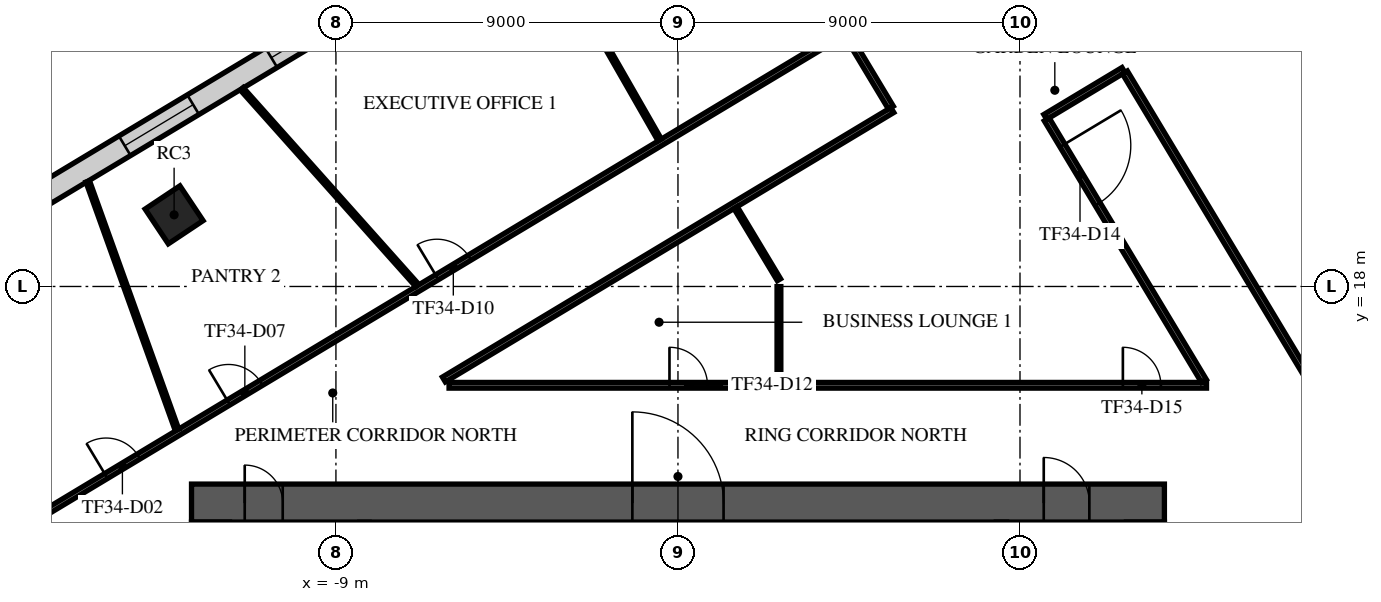
"""IFC4 building model, lengths in metres.
Left out: names, types, materials, properties, quantities, classifications, styles, units other than length and angle.
Written with IfcOpenShell. Run it as: python <this file> out.ifc"""

import sys

from ifc_helpers import new_model, si_unit, direction, frame, frame_2d, origin, origin_2d, place, context, subcontext, project, spatial, rectangle, extrude, element, fill, save


model = new_model("IFC4")
c1 = context("Model", 3, precision=1e-05, world=origin(), true_north=direction((0.0, 1.0)))
c2 = subcontext(c1, "Body", "Model", "MODEL_VIEW")
j1 = project(units=[si_unit("LENGTHUNIT", "METRE"), si_unit("PLANEANGLEUNIT", "RADIAN")], contexts=[c1])
p1 = place(None, origin())
s1 = spatial("IfcSite", under=j1, at=p1, CompositionType="ELEMENT")
p2 = place(p1, origin())
s2 = spatial("IfcBuilding", under=s1, at=p2, CompositionType="ELEMENT")
p3 = place(p2, frame((0.0, 0.0, 147.7)))
s3 = spatial("IfcBuildingStorey", under=s2, at=p3, CompositionType="ELEMENT", Elevation=147.7)
p4 = place(p3, frame((-13.258, 19.885, 0.0), z_axis=(0.0, 0.0, 1.0), x_axis=(0.832028680356, 0.55473261583, 0.0)))
e1 = element("IfcColumn", 1, at=p4, inside=s3, PredefinedType="COLUMN", context=c2, shape_type="SweptSolid", body=[
    extrude(rectangle(XDim=1.1, YDim=1.1, at=origin_2d()), origin(), (0.0, 0.0, 1.0), 4.0),
])
p5 = place(p3, frame((-12.8, 12.3, 0.0), z_axis=(0.0, 0.0, 1.0), x_axis=(1.0, 0.0, 0.0)))
e2 = element("IfcWall", 2, at=p5, inside=s3, PredefinedType="SHEAR", context=c2, shape_type="SweptSolid", body=[
    extrude(rectangle(XDim=25.6, YDim=1.0, at=frame_2d((12.8, 0.0))), origin(), (0.0, 0.0, 1.0), 3.6),
])
p6 = place(p5, frame((11.6, 0.0, 0.0)))
e3 = element("IfcOpeningElement", 3, at=p6, cuts=e2, PredefinedType="OPENING", context=c2, shape_type="SweptSolid", body=[
    extrude(rectangle(XDim=2.4, YDim=2.4, at=frame_2d((1.2, 1.2))), frame((0.0, 0.51, 0.0), z_axis=(0.0, -1.0, 0.0), x_axis=(1.0, 0.0, 0.0)), (0.0, 0.0, 1.0), 1.02),
])
p7 = place(p5, frame((22.425, 0.0, 0.0)))
e4 = element("IfcOpeningElement", 4, at=p7, cuts=e2, PredefinedType="OPENING", context=c2, shape_type="SweptSolid", body=[
    extrude(rectangle(XDim=1.2, YDim=2.1, at=frame_2d((0.6, 1.05))), frame((0.0, 0.51, 0.0), z_axis=(0.0, -1.0, 0.0), x_axis=(1.0, 0.0, 0.0)), (0.0, 0.0, 1.0), 1.02),
])
p8 = place(p5, frame((1.4, 0.0, 0.0)))
e5 = element("IfcOpeningElement", 5, at=p8, cuts=e2, PredefinedType="OPENING", context=c2, shape_type="SweptSolid", body=[
    extrude(rectangle(XDim=1.0, YDim=2.1, at=frame_2d((0.5, 1.05))), frame((0.0, 0.51, 0.0), z_axis=(0.0, -1.0, 0.0), x_axis=(1.0, 0.0, 0.0)), (0.0, 0.0, 1.0), 1.02),
])
p9 = place(p3, frame((7.558, 34.99, 0.0), z_axis=(0.0, 0.0, 1.0), x_axis=(-0.857166849875, -0.515038825212, 0.0)))
e6 = element("IfcWall", 6, at=p9, inside=s3, PredefinedType="STANDARD", context=c2, shape_type="SweptSolid", body=[
    extrude(rectangle(XDim=49.376, YDim=0.6, at=frame_2d((24.688, 0.0))), origin(), (0.0, 0.0, 1.0), 3.6),
])
p10 = place(p9, frame((1.2, 0.0, 0.9)))
e7 = element("IfcOpeningElement", 7, at=p10, cuts=e6, PredefinedType="OPENING", context=c2, shape_type="SweptSolid", body=[
    extrude(rectangle(XDim=2.1, YDim=2.1, at=frame_2d((1.05, 1.05))), frame((0.0, 0.31, 0.0), z_axis=(0.0, -1.0, 0.0), x_axis=(1.0, 0.0, 0.0)), (0.0, 0.0, 1.0), 0.62),
])
p11 = place(p9, frame((5.7, 0.0, 0.9)))
e8 = element("IfcOpeningElement", 8, at=p11, cuts=e6, PredefinedType="OPENING", context=c2, shape_type="SweptSolid", body=[
    extrude(rectangle(XDim=2.1, YDim=2.1, at=frame_2d((1.05, 1.05))), frame((0.0, 0.31, 0.0), z_axis=(0.0, -1.0, 0.0), x_axis=(1.0, 0.0, 0.0)), (0.0, 0.0, 1.0), 0.62),
])
p12 = place(p9, frame((10.2, 0.0, 0.9)))
e9 = element("IfcOpeningElement", 9, at=p12, cuts=e6, PredefinedType="OPENING", context=c2, shape_type="SweptSolid", body=[
    extrude(rectangle(XDim=2.1, YDim=2.1, at=frame_2d((1.05, 1.05))), frame((0.0, 0.31, 0.0), z_axis=(0.0, -1.0, 0.0), x_axis=(1.0, 0.0, 0.0)), (0.0, 0.0, 1.0), 0.62),
])
p13 = place(p9, frame((14.7, 0.0, 0.9)))
e10 = element("IfcOpeningElement", 10, at=p13, cuts=e6, PredefinedType="OPENING", context=c2, shape_type="SweptSolid", body=[
    extrude(rectangle(XDim=2.1, YDim=2.1, at=frame_2d((1.05, 1.05))), frame((0.0, 0.31, 0.0), z_axis=(0.0, -1.0, 0.0), x_axis=(1.0, 0.0, 0.0)), (0.0, 0.0, 1.0), 0.62),
])
p14 = place(p9, frame((19.2, 0.0, 0.9)))
e11 = element("IfcOpeningElement", 11, at=p14, cuts=e6, PredefinedType="OPENING", context=c2, shape_type="SweptSolid", body=[
    extrude(rectangle(XDim=2.1, YDim=2.1, at=frame_2d((1.05, 1.05))), frame((0.0, 0.31, 0.0), z_axis=(0.0, -1.0, 0.0), x_axis=(1.0, 0.0, 0.0)), (0.0, 0.0, 1.0), 0.62),
])
p15 = place(p9, frame((23.7, 0.0, 0.9)))
e12 = element("IfcOpeningElement", 12, at=p15, cuts=e6, PredefinedType="OPENING", context=c2, shape_type="SweptSolid", body=[
    extrude(rectangle(XDim=2.1, YDim=2.1, at=frame_2d((1.05, 1.05))), frame((0.0, 0.31, 0.0), z_axis=(0.0, -1.0, 0.0), x_axis=(1.0, 0.0, 0.0)), (0.0, 0.0, 1.0), 0.62),
])
p16 = place(p9, frame((28.2, 0.0, 0.9)))
e13 = element("IfcOpeningElement", 13, at=p16, cuts=e6, PredefinedType="OPENING", context=c2, shape_type="SweptSolid", body=[
    extrude(rectangle(XDim=2.1, YDim=2.1, at=frame_2d((1.05, 1.05))), frame((0.0, 0.31, 0.0), z_axis=(0.0, -1.0, 0.0), x_axis=(1.0, 0.0, 0.0)), (0.0, 0.0, 1.0), 0.62),
])
p17 = place(p9, frame((32.7, 0.0, 0.9)))
e14 = element("IfcOpeningElement", 14, at=p17, cuts=e6, PredefinedType="OPENING", context=c2, shape_type="SweptSolid", body=[
    extrude(rectangle(XDim=2.1, YDim=2.1, at=frame_2d((1.05, 1.05))), frame((0.0, 0.31, 0.0), z_axis=(0.0, -1.0, 0.0), x_axis=(1.0, 0.0, 0.0)), (0.0, 0.0, 1.0), 0.62),
])
p18 = place(p9, frame((37.2, 0.0, 0.9)))
e15 = element("IfcOpeningElement", 15, at=p18, cuts=e6, PredefinedType="OPENING", context=c2, shape_type="SweptSolid", body=[
    extrude(rectangle(XDim=2.1, YDim=2.1, at=frame_2d((1.05, 1.05))), frame((0.0, 0.31, 0.0), z_axis=(0.0, -1.0, 0.0), x_axis=(1.0, 0.0, 0.0)), (0.0, 0.0, 1.0), 0.62),
])
p19 = place(p9, frame((41.7, 0.0, 0.9)))
e16 = element("IfcOpeningElement", 16, at=p19, cuts=e6, PredefinedType="OPENING", context=c2, shape_type="SweptSolid", body=[
    extrude(rectangle(XDim=2.1, YDim=2.1, at=frame_2d((1.05, 1.05))), frame((0.0, 0.31, 0.0), z_axis=(0.0, -1.0, 0.0), x_axis=(1.0, 0.0, 0.0)), (0.0, 0.0, 1.0), 0.62),
])
p20 = place(p9, frame((46.138, 0.0, 0.9)))
e17 = element("IfcOpeningElement", 17, at=p20, cuts=e6, PredefinedType="OPENING", context=c2, shape_type="SweptSolid", body=[
    extrude(rectangle(XDim=2.1, YDim=2.1, at=frame_2d((1.05, 1.05))), frame((0.0, 0.31, 0.0), z_axis=(0.0, -1.0, 0.0), x_axis=(1.0, 0.0, 0.0)), (0.0, 0.0, 1.0), 0.62),
])
p21 = place(p3, frame((36.416, -2.94, 0.0), z_axis=(0.0, 0.0, 1.0), x_axis=(-0.515039615037, 0.857166375299, 0.0)))
e18 = element("IfcWall", 18, at=p21, inside=s3, PredefinedType="STANDARD", context=c2, shape_type="SweptSolid", body=[
    extrude(rectangle(XDim=42.176, YDim=0.6, at=frame_2d((21.088, 0.0))), origin(), (0.0, 0.0, 1.0), 3.6),
])
p22 = place(p21, frame((1.138, 0.0, 0.9)))
e19 = element("IfcOpeningElement", 19, at=p22, cuts=e18, PredefinedType="OPENING", context=c2, shape_type="SweptSolid", body=[
    extrude(rectangle(XDim=2.3, YDim=2.1, at=frame_2d((1.15, 1.05))), frame((0.0, 0.31, 0.0), z_axis=(0.0, -1.0, 0.0), x_axis=(1.0, 0.0, 0.0)), (0.0, 0.0, 1.0), 0.62),
])
p23 = place(p21, frame((5.776, 0.0, 0.9)))
e20 = element("IfcOpeningElement", 20, at=p23, cuts=e18, PredefinedType="OPENING", context=c2, shape_type="SweptSolid", body=[
    extrude(rectangle(XDim=2.3, YDim=2.1, at=frame_2d((1.15, 1.05))), frame((0.0, 0.31, 0.0), z_axis=(0.0, -1.0, 0.0), x_axis=(1.0, 0.0, 0.0)), (0.0, 0.0, 1.0), 0.62),
])
p24 = place(p21, frame((10.476, 0.0, 0.9)))
e21 = element("IfcOpeningElement", 21, at=p24, cuts=e18, PredefinedType="OPENING", context=c2, shape_type="SweptSolid", body=[
    extrude(rectangle(XDim=2.3, YDim=2.1, at=frame_2d((1.15, 1.05))), frame((0.0, 0.31, 0.0), z_axis=(0.0, -1.0, 0.0), x_axis=(1.0, 0.0, 0.0)), (0.0, 0.0, 1.0), 0.62),
])
p25 = place(p21, frame((15.176, 0.0, 0.9)))
e22 = element("IfcOpeningElement", 22, at=p25, cuts=e18, PredefinedType="OPENING", context=c2, shape_type="SweptSolid", body=[
    extrude(rectangle(XDim=2.3, YDim=2.1, at=frame_2d((1.15, 1.05))), frame((0.0, 0.31, 0.0), z_axis=(0.0, -1.0, 0.0), x_axis=(1.0, 0.0, 0.0)), (0.0, 0.0, 1.0), 0.62),
])
p26 = place(p21, frame((19.876, 0.0, 0.9)))
e23 = element("IfcOpeningElement", 23, at=p26, cuts=e18, PredefinedType="OPENING", context=c2, shape_type="SweptSolid", body=[
    extrude(rectangle(XDim=2.3, YDim=2.1, at=frame_2d((1.15, 1.05))), frame((0.0, 0.31, 0.0), z_axis=(0.0, -1.0, 0.0), x_axis=(1.0, 0.0, 0.0)), (0.0, 0.0, 1.0), 0.62),
])
p27 = place(p21, frame((24.576, 0.0, 0.9)))
e24 = element("IfcOpeningElement", 24, at=p27, cuts=e18, PredefinedType="OPENING", context=c2, shape_type="SweptSolid", body=[
    extrude(rectangle(XDim=2.3, YDim=2.1, at=frame_2d((1.15, 1.05))), frame((0.0, 0.31, 0.0), z_axis=(0.0, -1.0, 0.0), x_axis=(1.0, 0.0, 0.0)), (0.0, 0.0, 1.0), 0.62),
])
p28 = place(p21, frame((29.276, 0.0, 0.9)))
e25 = element("IfcOpeningElement", 25, at=p28, cuts=e18, PredefinedType="OPENING", context=c2, shape_type="SweptSolid", body=[
    extrude(rectangle(XDim=2.3, YDim=2.1, at=frame_2d((1.15, 1.05))), frame((0.0, 0.31, 0.0), z_axis=(0.0, -1.0, 0.0), x_axis=(1.0, 0.0, 0.0)), (0.0, 0.0, 1.0), 0.62),
])
p29 = place(p21, frame((33.976, 0.0, 0.9)))
e26 = element("IfcOpeningElement", 26, at=p29, cuts=e18, PredefinedType="OPENING", context=c2, shape_type="SweptSolid", body=[
    extrude(rectangle(XDim=2.3, YDim=2.1, at=frame_2d((1.15, 1.05))), frame((0.0, 0.31, 0.0), z_axis=(0.0, -1.0, 0.0), x_axis=(1.0, 0.0, 0.0)), (0.0, 0.0, 1.0), 0.62),
])
p30 = place(p21, frame((38.676, 0.0, 0.9)))
e27 = element("IfcOpeningElement", 27, at=p30, cuts=e18, PredefinedType="OPENING", context=c2, shape_type="SweptSolid", body=[
    extrude(rectangle(XDim=2.3, YDim=2.1, at=frame_2d((1.15, 1.05))), frame((0.0, 0.31, 0.0), z_axis=(0.0, -1.0, 0.0), x_axis=(1.0, 0.0, 0.0)), (0.0, 0.0, 1.0), 0.62),
])
p31 = place(p3, frame((-23.876, 7.707, 0.0), z_axis=(0.0, 0.0, 1.0), x_axis=(0.857167605318, 0.515037567943, 0.0)))
e28 = element("IfcWall", 28, at=p31, inside=s3, PredefinedType="PARTITIONING", context=c2, shape_type="SweptSolid", body=[
    extrude(rectangle(XDim=32.994, YDim=0.15, at=frame_2d((16.497, 0.0))), origin(), (0.0, 0.0, 1.0), 3.15),
])
p32 = place(p31, frame((1.8, 0.0, 0.0)))
e29 = element("IfcOpeningElement", 29, at=p32, cuts=e28, PredefinedType="OPENING", context=c2, shape_type="SweptSolid", body=[
    extrude(rectangle(XDim=1.8, YDim=2.1, at=frame_2d((0.9, 1.05))), frame((0.0, 0.085, 0.0), z_axis=(0.0, -1.0, 0.0), x_axis=(1.0, 0.0, 0.0)), (0.0, 0.0, 1.0), 0.17),
])
p33 = place(p31, frame((10.3, 0.0, 0.0)))
e30 = element("IfcOpeningElement", 30, at=p33, cuts=e28, PredefinedType="OPENING", context=c2, shape_type="SweptSolid", body=[
    extrude(rectangle(XDim=1.0, YDim=2.1, at=frame_2d((0.5, 1.05))), frame((0.0, 0.085, 0.0), z_axis=(0.0, -1.0, 0.0), x_axis=(1.0, 0.0, 0.0)), (0.0, 0.0, 1.0), 0.17),
])
p34 = place(p31, frame((14.059, 0.0, 0.0)))
e31 = element("IfcOpeningElement", 31, at=p34, cuts=e28, PredefinedType="OPENING", context=c2, shape_type="SweptSolid", body=[
    extrude(rectangle(XDim=1.0, YDim=2.1, at=frame_2d((0.5, 1.05))), frame((0.0, 0.085, 0.0), z_axis=(0.0, -1.0, 0.0), x_axis=(1.0, 0.0, 0.0)), (0.0, 0.0, 1.0), 0.17),
])
p35 = place(p31, frame((20.458, 0.0, 0.0)))
e32 = element("IfcOpeningElement", 32, at=p35, cuts=e28, PredefinedType="OPENING", context=c2, shape_type="SweptSolid", body=[
    extrude(rectangle(XDim=1.0, YDim=2.1, at=frame_2d((0.5, 1.05))), frame((0.0, 0.085, 0.0), z_axis=(0.0, -1.0, 0.0), x_axis=(1.0, 0.0, 0.0)), (0.0, 0.0, 1.0), 0.17),
])
p36 = place(p3, frame((-6.16, 15.552, 0.0), z_axis=(0.0, 0.0, 1.0), x_axis=(0.857176686564, 0.51502245389, 0.0)))
e33 = element("IfcWall", 33, at=p36, inside=s3, PredefinedType="PARTITIONING", context=c2, shape_type="SweptSolid", body=[
    extrude(rectangle(XDim=13.767, YDim=0.15, at=frame_2d((6.884, 0.0))), origin(), (0.0, 0.0, 1.0), 3.15),
])
p37 = place(p3, frame((-6.023, 15.4, 0.0), z_axis=(0.0, 0.0, 1.0), x_axis=(1.0, 0.0, 0.0)))
e34 = element("IfcWall", 34, at=p37, inside=s3, PredefinedType="PARTITIONING", context=c2, shape_type="SweptSolid", body=[
    extrude(rectangle(XDim=19.931, YDim=0.15, at=frame_2d((9.966, 0.0))), origin(), (0.0, 0.0, 1.0), 3.15),
])
p38 = place(p37, frame((5.8, 0.0, 0.0)))
e35 = element("IfcOpeningElement", 35, at=p38, cuts=e34, PredefinedType="OPENING", context=c2, shape_type="SweptSolid", body=[
    extrude(rectangle(XDim=1.0, YDim=2.1, at=frame_2d((0.5, 1.05))), frame((0.0, 0.085, 0.0), z_axis=(0.0, -1.0, 0.0), x_axis=(1.0, 0.0, 0.0)), (0.0, 0.0, 1.0), 0.17),
])
p39 = place(p37, frame((17.73, 0.0, 0.0)))
e36 = element("IfcOpeningElement", 36, at=p39, cuts=e34, PredefinedType="OPENING", context=c2, shape_type="SweptSolid", body=[
    extrude(rectangle(XDim=1.0, YDim=2.1, at=frame_2d((0.5, 1.05))), frame((0.0, 0.085, 0.0), z_axis=(0.0, -1.0, 0.0), x_axis=(1.0, 0.0, 0.0)), (0.0, 0.0, 1.0), 0.17),
])
p40 = place(p3, frame((4.444, 24.636, 0.0), z_axis=(0.0, 0.0, 1.0), x_axis=(0.514830717933, -0.857291859213, 0.0)))
e37 = element("IfcWall", 37, at=p40, inside=s3, PredefinedType="PARTITIONING", context=c2, shape_type="SweptSolid", body=[
    extrude(rectangle(XDim=2.251, YDim=0.15, at=frame_2d((1.125, 0.0))), origin(), (0.0, 0.0, 1.0), 3.6),
])
p41 = place(p3, frame((9.665, 22.461, 0.0), z_axis=(0.0, 0.0, 1.0), x_axis=(0.857133645358, 0.515094082664, 0.0)))
e38 = element("IfcWall", 38, at=p41, inside=s3, PredefinedType="PARTITIONING", context=c2, shape_type="SweptSolid", body=[
    extrude(rectangle(XDim=2.4, YDim=0.15, at=frame_2d((1.2, 0.0))), origin(), (0.0, 0.0, 1.0), 3.15),
])
p42 = place(p3, frame((9.704, 22.397, 0.0), z_axis=(0.0, 0.0, 1.0), x_axis=(0.51505899604, -0.857154729671, 0.0)))
e39 = element("IfcWall", 39, at=p42, inside=s3, PredefinedType="PARTITIONING", context=c2, shape_type="SweptSolid", body=[
    extrude(rectangle(XDim=8.03, YDim=0.15, at=frame_2d((4.015, 0.0))), origin(), (0.0, 0.0, 1.0), 3.15),
])
p43 = place(p42, frame((0.8, 0.0, 0.0)))
e40 = element("IfcOpeningElement", 40, at=p43, cuts=e39, PredefinedType="OPENING", context=c2, shape_type="SweptSolid", body=[
    extrude(rectangle(XDim=1.8, YDim=2.1, at=frame_2d((0.9, 1.05))), frame((0.0, 0.085, 0.0), z_axis=(0.0, -1.0, 0.0), x_axis=(1.0, 0.0, 0.0)), (0.0, 0.0, 1.0), 0.17),
])
p44 = place(p3, frame((11.76, 23.633, 0.0), z_axis=(0.0, 0.0, 1.0), x_axis=(0.515060503771, -0.857153823684, 0.0)))
e41 = element("IfcWall", 41, at=p44, inside=s3, PredefinedType="PARTITIONING", context=c2, shape_type="SweptSolid", body=[
    extrude(rectangle(XDim=28.475, YDim=0.15, at=frame_2d((14.238, 0.0))), origin(), (0.0, 0.0, 1.0), 3.15),
])
p45 = place(p44, frame((12.149, 0.0, 0.0)))
e42 = element("IfcOpeningElement", 42, at=p45, cuts=e41, PredefinedType="OPENING", context=c2, shape_type="SweptSolid", body=[
    extrude(rectangle(XDim=1.0, YDim=2.1, at=frame_2d((0.5, 1.05))), frame((0.0, 0.085, 0.0), z_axis=(0.0, -1.0, 0.0), x_axis=(1.0, 0.0, 0.0)), (0.0, 0.0, 1.0), 0.17),
])
p46 = place(p44, frame((19.62, 0.0, 0.0)))
e43 = element("IfcOpeningElement", 43, at=p46, cuts=e41, PredefinedType="OPENING", context=c2, shape_type="SweptSolid", body=[
    extrude(rectangle(XDim=1.0, YDim=2.1, at=frame_2d((0.5, 1.05))), frame((0.0, 0.085, 0.0), z_axis=(0.0, -1.0, 0.0), x_axis=(1.0, 0.0, 0.0)), (0.0, 0.0, 1.0), 0.17),
])
p47 = place(p44, frame((26.005, 0.0, 0.0)))
e44 = element("IfcOpeningElement", 44, at=p47, cuts=e41, PredefinedType="OPENING", context=c2, shape_type="SweptSolid", body=[
    extrude(rectangle(XDim=1.8, YDim=2.1, at=frame_2d((0.9, 1.05))), frame((0.0, 0.085, 0.0), z_axis=(0.0, -1.0, 0.0), x_axis=(1.0, 0.0, 0.0)), (0.0, 0.0, 1.0), 0.17),
])
p48 = place(p3, frame((-15.531, 20.765, 0.0), z_axis=(0.0, 0.0, 1.0), x_axis=(0.338062005874, -0.941123838921, 0.0)))
e45 = element("IfcWall", 45, at=p48, inside=s3, PredefinedType="PARTITIONING", context=c2, shape_type="SweptSolid", body=[
    extrude(rectangle(XDim=6.944, YDim=0.1, at=frame_2d((3.472, 0.0))), origin(), (0.0, 0.0, 1.0), 2.9),
])
p49 = place(p3, frame((-11.477, 23.201, 0.0), z_axis=(0.0, 0.0, 1.0), x_axis=(0.665742072215, -0.74618194382, 0.0)))
e46 = element("IfcWall", 46, at=p49, inside=s3, PredefinedType="PARTITIONING", context=c2, shape_type="SweptSolid", body=[
    extrude(rectangle(XDim=6.932, YDim=0.1, at=frame_2d((3.466, 0.0))), origin(), (0.0, 0.0, 1.0), 2.9),
])
p50 = place(p3, frame((-3.869, 27.772, 0.0), z_axis=(0.0, 0.0, 1.0), x_axis=(0.496921350826, -0.867795581398, 0.0)))
e47 = element("IfcWall", 47, at=p50, inside=s3, PredefinedType="PARTITIONING", context=c2, shape_type="SweptSolid", body=[
    extrude(rectangle(XDim=6.82, YDim=0.1, at=frame_2d((3.41, 0.0))), origin(), (0.0, 0.0, 1.0), 2.9),
])
p51 = place(p3, frame((1.516, 20.076, 0.0), z_axis=(0.0, 0.0, 1.0), x_axis=(0.515208669109, -0.857064774259, 0.0)))
e48 = element("IfcWall", 48, at=p51, inside=s3, PredefinedType="PARTITIONING", context=c2, shape_type="SweptSolid", body=[
    extrude(rectangle(XDim=2.215, YDim=0.1, at=frame_2d((1.108, 0.0))), origin(), (0.0, 0.0, 1.0), 3.15),
])
p52 = place(p3, frame((2.657, 15.475, 0.0), z_axis=(0.0, 0.0, 1.0), x_axis=(0.0, 1.0, 0.0)))
e49 = element("IfcWall", 49, at=p52, inside=s3, PredefinedType="PARTITIONING", context=c2, shape_type="SweptSolid", body=[
    extrude(rectangle(XDim=2.522, YDim=0.1, at=frame_2d((1.261, 0.0))), origin(), (0.0, 0.0, 1.0), 3.15),
])
p53 = place(p6, origin())
e50 = element("IfcDoor", 50, at=p53, inside=s3, OperationType="SINGLE_SWING_LEFT", PredefinedType="DOOR", context=c2, shape_type="SweptSolid", body=[
    extrude(rectangle(XDim=2.4, YDim=2.4, at=frame_2d((1.2, 1.2))), frame((0.0, 0.025, 0.0), z_axis=(0.0, -1.0, 0.0), x_axis=(1.0, 0.0, 0.0)), (0.0, 0.0, 1.0), 0.05),
])
fill(e3, e50)
p54 = place(p7, origin())
e51 = element("IfcDoor", 51, at=p54, inside=s3, OperationType="SINGLE_SWING_LEFT", PredefinedType="DOOR", context=c2, shape_type="SweptSolid", body=[
    extrude(rectangle(XDim=1.2, YDim=2.1, at=frame_2d((0.6, 1.05))), frame((0.0, 0.025, 0.0), z_axis=(0.0, -1.0, 0.0), x_axis=(1.0, 0.0, 0.0)), (0.0, 0.0, 1.0), 0.05),
])
fill(e4, e51)
p55 = place(p8, origin())
e52 = element("IfcDoor", 52, at=p55, inside=s3, OperationType="SINGLE_SWING_LEFT", PredefinedType="DOOR", context=c2, shape_type="SweptSolid", body=[
    extrude(rectangle(XDim=1.0, YDim=2.1, at=frame_2d((0.5, 1.05))), frame((0.0, 0.025, 0.0), z_axis=(0.0, -1.0, 0.0), x_axis=(1.0, 0.0, 0.0)), (0.0, 0.0, 1.0), 0.05),
])
fill(e5, e52)
p56 = place(p14, origin())
e53 = element("IfcWindow", 53, at=p56, inside=s3, PartitioningType="SINGLE_PANEL", PredefinedType="WINDOW", context=c2, shape_type="SweptSolid", body=[
    extrude(rectangle(XDim=2.1, YDim=2.1, at=frame_2d((1.05, 1.05))), frame((0.0, 0.03, 0.0), z_axis=(0.0, -1.0, 0.0), x_axis=(1.0, 0.0, 0.0)), (0.0, 0.0, 1.0), 0.06),
])
fill(e11, e53)
p57 = place(p15, origin())
e54 = element("IfcWindow", 54, at=p57, inside=s3, PartitioningType="SINGLE_PANEL", PredefinedType="WINDOW", context=c2, shape_type="SweptSolid", body=[
    extrude(rectangle(XDim=2.1, YDim=2.1, at=frame_2d((1.05, 1.05))), frame((0.0, 0.03, 0.0), z_axis=(0.0, -1.0, 0.0), x_axis=(1.0, 0.0, 0.0)), (0.0, 0.0, 1.0), 0.06),
])
fill(e12, e54)
p58 = place(p33, origin())
e55 = element("IfcDoor", 55, at=p58, inside=s3, OperationType="SINGLE_SWING_RIGHT", PredefinedType="DOOR", context=c2, shape_type="SweptSolid", body=[
    extrude(rectangle(XDim=1.0, YDim=2.1, at=frame_2d((0.5, 1.05))), frame((0.0, 0.025, 0.0), z_axis=(0.0, -1.0, 0.0), x_axis=(1.0, 0.0, 0.0)), (0.0, 0.0, 1.0), 0.05),
])
fill(e30, e55)
p59 = place(p34, origin())
e56 = element("IfcDoor", 56, at=p59, inside=s3, OperationType="SINGLE_SWING_LEFT", PredefinedType="DOOR", context=c2, shape_type="SweptSolid", body=[
    extrude(rectangle(XDim=1.0, YDim=2.1, at=frame_2d((0.5, 1.05))), frame((0.0, 0.025, 0.0), z_axis=(0.0, -1.0, 0.0), x_axis=(1.0, 0.0, 0.0)), (0.0, 0.0, 1.0), 0.05),
])
fill(e31, e56)
p60 = place(p35, origin())
e57 = element("IfcDoor", 57, at=p60, inside=s3, OperationType="SINGLE_SWING_LEFT", PredefinedType="DOOR", context=c2, shape_type="SweptSolid", body=[
    extrude(rectangle(XDim=1.0, YDim=2.1, at=frame_2d((0.5, 1.05))), frame((0.0, 0.025, 0.0), z_axis=(0.0, -1.0, 0.0), x_axis=(1.0, 0.0, 0.0)), (0.0, 0.0, 1.0), 0.05),
])
fill(e32, e57)
p61 = place(p38, origin())
e58 = element("IfcDoor", 58, at=p61, inside=s3, OperationType="SINGLE_SWING_RIGHT", PredefinedType="DOOR", context=c2, shape_type="SweptSolid", body=[
    extrude(rectangle(XDim=1.0, YDim=2.1, at=frame_2d((0.5, 1.05))), frame((0.0, 0.025, 0.0), z_axis=(0.0, -1.0, 0.0), x_axis=(1.0, 0.0, 0.0)), (0.0, 0.0, 1.0), 0.05),
])
fill(e35, e58)
p62 = place(p43, frame((1.8, 0.0, 0.0), z_axis=(0.0, 0.0, 1.0), x_axis=(-1.0, 0.0, 0.0)))
e59 = element("IfcDoor", 59, at=p62, inside=s3, OperationType="DOUBLE_DOOR_SINGLE_SWING", PredefinedType="DOOR", context=c2, shape_type="SweptSolid", body=[
    extrude(rectangle(XDim=1.8, YDim=2.1, at=frame_2d((0.9, 1.05))), frame((0.0, 0.025, 0.0), z_axis=(0.0, -1.0, 0.0), x_axis=(1.0, 0.0, 0.0)), (0.0, 0.0, 1.0), 0.05),
])
fill(e40, e59)
p63 = place(p39, origin())
e60 = element("IfcDoor", 60, at=p63, inside=s3, OperationType="SINGLE_SWING_RIGHT", PredefinedType="DOOR", context=c2, shape_type="SweptSolid", body=[
    extrude(rectangle(XDim=1.0, YDim=2.1, at=frame_2d((0.5, 1.05))), frame((0.0, 0.025, 0.0), z_axis=(0.0, -1.0, 0.0), x_axis=(1.0, 0.0, 0.0)), (0.0, 0.0, 1.0), 0.05),
])
fill(e36, e60)
save(model, sys.argv[1])
